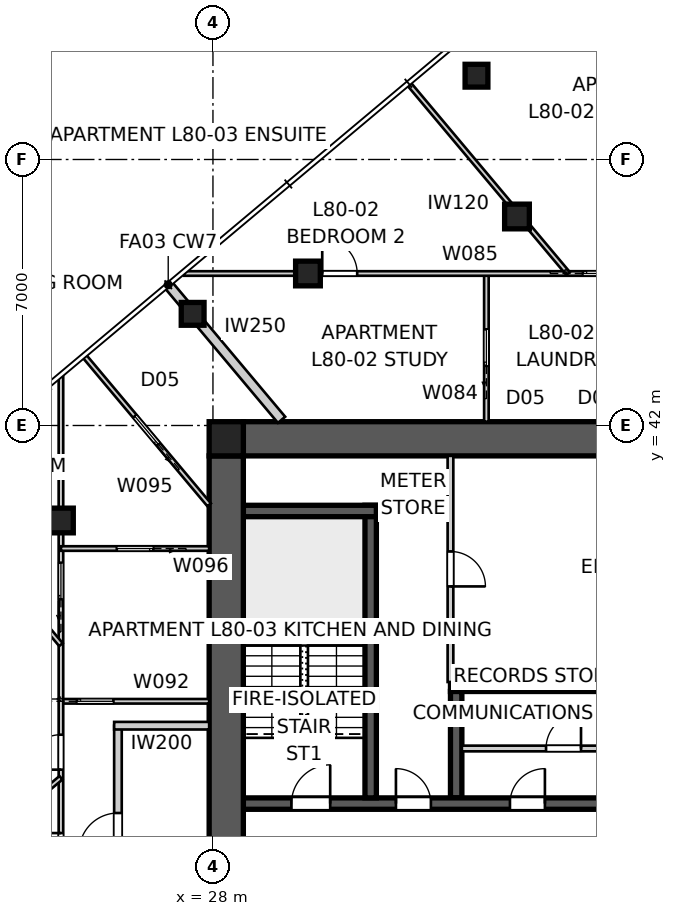
"""IFC4 building model, lengths in metres.
Left out: names, types, materials, properties, quantities, classifications, styles, units other than length and angle.
Written with IfcOpenShell. Run it as: python <this file> out.ifc"""

import sys

from ifc_helpers import new_model, si_unit, direction, frame, frame_2d, origin, origin_2d, place, context, subcontext, project, spatial, polyline, rectangle, outline, extrude, element, fill, save


model = new_model("IFC4")
c1 = context("Model", 3, precision=1e-05, world=origin(), true_north=direction((0.0, 1.0)))
c2 = subcontext(c1, "Body", "Model", "MODEL_VIEW")
j1 = project(units=[si_unit("LENGTHUNIT", "METRE"), si_unit("PLANEANGLEUNIT", "RADIAN")], contexts=[c1])
p1 = place(None, origin())
s1 = spatial("IfcSite", under=j1, at=p1, CompositionType="ELEMENT")
p2 = place(p1, origin())
s2 = spatial("IfcBuilding", under=s1, at=p2, CompositionType="ELEMENT")
p3 = place(p2, frame((0.0, 0.0, 289.6)))
s3 = spatial("IfcBuildingStorey", under=s2, at=p3, CompositionType="ELEMENT", Elevation=289.6)
p4 = place(p3, frame((28.8, 41.65, 0.0), z_axis=(0.0, 0.0, 1.0), x_axis=(1.0, 0.0, 0.0)))
e1 = element("IfcWall", 1, at=p4, inside=s3, PredefinedType="SHEAR", context=c2, shape_type="SweptSolid", body=[
    extrude(outline(polyline([(0.0, -0.45), (22.4, -0.45), (22.4, -0.025), (22.85, -0.025), (22.85, 0.025), (22.4, 0.025), (22.4, 0.45), (0.0, 0.45), (0.0, 0.025), (-0.45, 0.025), (-0.45, -0.025), (0.0, -0.025), (0.0, -0.45)])), origin(), (0.0, 0.0, 1.0), 3.4),
])
p5 = place(p3, frame((28.35, 41.2, 0.0), z_axis=(0.0, 0.0, 1.0), x_axis=(0.0, -1.0, 0.0)))
e2 = element("IfcWall", 2, at=p5, inside=s3, PredefinedType="SHEAR", context=c2, shape_type="SweptSolid", body=[
    extrude(outline(polyline([(0.0, -0.45), (22.4, -0.45), (22.4, -0.025), (22.85, -0.025), (22.85, 0.025), (22.4, 0.025), (22.4, 0.45), (0.0, 0.45), (0.0, 0.025), (-0.45, 0.025), (-0.45, -0.025), (0.0, -0.025), (0.0, -0.45)])), origin(), (0.0, 0.0, 1.0), 3.4),
])
p6 = place(p5, frame((11.14, 0.0, 0.0)))
e3 = element("IfcOpeningElement", 3, at=p6, cuts=e2, PredefinedType="OPENING", context=c2, shape_type="SweptSolid", body=[
    extrude(rectangle(XDim=1.02, YDim=2.4, at=frame_2d((0.51, 1.2))), frame((0.0, 0.46, 0.0), z_axis=(0.0, -1.0, 0.0), x_axis=(1.0, 0.0, 0.0)), (0.0, 0.0, 1.0), 0.92),
])
p7 = place(p3, frame((28.8, 32.05, 0.0), z_axis=(0.0, 0.0, 1.0), x_axis=(1.0, 0.0, 0.0)))
e4 = element("IfcWall", 4, at=p7, inside=s3, PredefinedType="SHEAR", context=c2, shape_type="SweptSolid", body=[
    extrude(rectangle(XDim=22.4, YDim=0.3, at=frame_2d((11.2, 0.0))), origin(), (0.0, 0.0, 1.0), 3.4),
])
p8 = place(p7, frame((19.04, 0.0, 0.0)))
e5 = element("IfcOpeningElement", 5, at=p8, cuts=e4, PredefinedType="OPENING", context=c2, shape_type="SweptSolid", body=[
    extrude(rectangle(XDim=0.92, YDim=2.1, at=frame_2d((0.46, 1.05))), frame((0.0, 0.16, 0.0), z_axis=(0.0, -1.0, 0.0), x_axis=(1.0, 0.0, 0.0)), (0.0, 0.0, 1.0), 0.32),
])
p9 = place(p7, frame((1.265, 0.0, 0.0)))
e6 = element("IfcOpeningElement", 6, at=p9, cuts=e4, PredefinedType="OPENING", context=c2, shape_type="SweptSolid", body=[
    extrude(rectangle(XDim=1.02, YDim=2.1, at=frame_2d((0.51, 1.05))), frame((0.0, 0.16, 0.0), z_axis=(0.0, -1.0, 0.0), x_axis=(1.0, 0.0, 0.0)), (0.0, 0.0, 1.0), 0.32),
])
p10 = place(p7, frame((4.015, 0.0, 0.0)))
e7 = element("IfcOpeningElement", 7, at=p10, cuts=e4, PredefinedType="OPENING", context=c2, shape_type="SweptSolid", body=[
    extrude(rectangle(XDim=0.92, YDim=2.1, at=frame_2d((0.46, 1.05))), frame((0.0, 0.16, 0.0), z_axis=(0.0, -1.0, 0.0), x_axis=(1.0, 0.0, 0.0)), (0.0, 0.0, 1.0), 0.32),
])
p11 = place(p7, frame((7.015, 0.0, 0.0)))
e8 = element("IfcOpeningElement", 8, at=p11, cuts=e4, PredefinedType="OPENING", context=c2, shape_type="SweptSolid", body=[
    extrude(rectangle(XDim=0.92, YDim=2.1, at=frame_2d((0.46, 1.05))), frame((0.0, 0.16, 0.0), z_axis=(0.0, -1.0, 0.0), x_axis=(1.0, 0.0, 0.0)), (0.0, 0.0, 1.0), 0.32),
])
p12 = place(p7, frame((9.34, 0.0, 0.0)))
e9 = element("IfcOpeningElement", 9, at=p12, cuts=e4, PredefinedType="OPENING", context=c2, shape_type="SweptSolid", body=[
    extrude(rectangle(XDim=0.92, YDim=2.1, at=frame_2d((0.46, 1.05))), frame((0.0, 0.16, 0.0), z_axis=(0.0, -1.0, 0.0), x_axis=(1.0, 0.0, 0.0)), (0.0, 0.0, 1.0), 0.32),
])
p13 = place(p7, frame((12.05, 0.0, 0.0)))
e10 = element("IfcOpeningElement", 10, at=p13, cuts=e4, PredefinedType="OPENING", context=c2, shape_type="SweptSolid", body=[
    extrude(rectangle(XDim=1.1, YDim=2.1, at=frame_2d((0.55, 1.05))), frame((0.0, 0.16, 0.0), z_axis=(0.0, -1.0, 0.0), x_axis=(1.0, 0.0, 0.0)), (0.0, 0.0, 1.0), 0.32),
])
p14 = place(p7, frame((14.85, 0.0, 0.0)))
e11 = element("IfcOpeningElement", 11, at=p14, cuts=e4, PredefinedType="OPENING", context=c2, shape_type="SweptSolid", body=[
    extrude(rectangle(XDim=1.1, YDim=2.1, at=frame_2d((0.55, 1.05))), frame((0.0, 0.16, 0.0), z_axis=(0.0, -1.0, 0.0), x_axis=(1.0, 0.0, 0.0)), (0.0, 0.0, 1.0), 0.32),
])
p15 = place(p3, frame((34.25, 35.15, 0.0), z_axis=(0.0, 0.0, 1.0), x_axis=(1.0, 0.0, 0.0)))
e12 = element("IfcWall", 12, at=p15, inside=s3, PredefinedType="SHEAR", context=c2, shape_type="SweptSolid", body=[
    extrude(rectangle(XDim=11.5, YDim=0.3, at=frame_2d((5.75, 0.0))), origin(), (0.0, 0.0, 1.0), 3.4),
])
p16 = place(p3, frame((34.4, 32.2, 0.0), z_axis=(0.0, 0.0, 1.0), x_axis=(0.0, 1.0, 0.0)))
e13 = element("IfcWall", 13, at=p16, inside=s3, PredefinedType="SHEAR", context=c2, shape_type="SweptSolid", body=[
    extrude(rectangle(XDim=2.8, YDim=0.3, at=frame_2d((1.4, 0.0))), origin(), (0.0, 0.0, 1.0), 3.4),
])
p17 = place(p3, frame((32.15, 32.2, 0.0), z_axis=(0.0, 0.0, 1.0), x_axis=(0.0, 1.0, 0.0)))
e14 = element("IfcWall", 14, at=p17, inside=s3, PredefinedType="SHEAR", context=c2, shape_type="SweptSolid", body=[
    extrude(rectangle(XDim=7.7, YDim=0.3, at=frame_2d((3.85, 0.0))), origin(), (0.0, 0.0, 1.0), 3.4),
])
p18 = place(p3, frame((28.8, 39.75, 0.0), z_axis=(0.0, 0.0, 1.0), x_axis=(1.0, 0.0, 0.0)))
e15 = element("IfcWall", 15, at=p18, inside=s3, PredefinedType="SHEAR", context=c2, shape_type="SweptSolid", body=[
    extrude(rectangle(XDim=3.5, YDim=0.3, at=frame_2d((1.75, 0.0))), origin(), (0.0, 0.0, 1.0), 3.4),
])
p19 = place(p3, frame((28.35, 41.65, 0.0), z_axis=(0.0, 0.0, 1.0), x_axis=(1.0, 0.0, 0.0)))
e16 = element("IfcColumn", 16, at=p19, inside=s3, PredefinedType="COLUMN", context=c2, shape_type="SweptSolid", body=[
    extrude(rectangle(XDim=0.9, YDim=0.9, at=origin_2d()), origin(), (0.0, 0.0, 1.0), 3.4),
])
for number, where, z_axis, x_axis in (
    (17, (34.935, 51.205, 0.0), (0.0, 0.0, 1.0), (1.0, 0.0, 0.0)),
    (18, (27.466, 44.938, 0.0), (0.0, 0.0, 1.0), (1.0, 0.0, 0.0)),
):
    element("IfcColumn", number, at=place(p3, frame(where, z_axis=z_axis, x_axis=x_axis)), inside=s3, PredefinedType="COLUMN", context=c2, shape_type="SweptSolid", body=[
        extrude(rectangle(XDim=0.6, YDim=0.6, at=origin_2d()), origin(), (0.0, 0.0, 1.0), 3.4),
    ])
for number, where, z_axis, x_axis in (
    (19, (36.0, 47.5, 0.0), (0.0, 0.0, 1.0), (1.0, 0.0, 0.0)),
    (20, (30.5, 46.0, 0.0), (0.0, 0.0, 1.0), (1.0, 0.0, 0.0)),
    (21, (24.0, 39.5, 0.0), (0.0, 0.0, 1.0), (1.0, 0.0, 0.0)),
):
    element("IfcColumn", number, at=place(p3, frame(where, z_axis=z_axis, x_axis=x_axis)), inside=s3, PredefinedType="COLUMN", context=c2, shape_type="SweptSolid", body=[
        extrude(rectangle(XDim=0.65, YDim=0.65, at=origin_2d()), origin(), (0.0, 0.0, 1.0), 3.4),
    ])
p20 = place(p3, frame((25.5, 25.9, 0.0), z_axis=(0.0, 0.0, 1.0), x_axis=(0.0, 1.0, 0.0)))
e22 = element("IfcWall", 22, at=p20, inside=s3, PredefinedType="PARTITIONING", context=c2, shape_type="SweptSolid", body=[
    extrude(rectangle(XDim=8.2, YDim=0.2, at=frame_2d((4.1, 0.0))), origin(), (0.0, 0.0, 1.0), 3.25),
])
p21 = place(p20, frame((4.882, 0.0, 0.0)))
e23 = element("IfcOpeningElement", 23, at=p21, cuts=e22, PredefinedType="OPENING", context=c2, shape_type="SweptSolid", body=[
    extrude(rectangle(XDim=1.02, YDim=2.34, at=frame_2d((0.51, 1.17))), frame((0.0, 0.11, 0.0), z_axis=(0.0, -1.0, 0.0), x_axis=(1.0, 0.0, 0.0)), (0.0, 0.0, 1.0), 0.22),
])
p22 = place(p3, frame((27.9, 34.1, 0.0), z_axis=(0.0, 0.0, 1.0), x_axis=(-1.0, 0.0, 0.0)))
e24 = element("IfcWall", 24, at=p22, inside=s3, PredefinedType="PARTITIONING", context=c2, shape_type="SweptSolid", body=[
    extrude(rectangle(XDim=2.5, YDim=0.2, at=frame_2d((1.25, 0.0))), origin(), (0.0, 0.0, 1.0), 3.25),
])
p23 = place(p3, frame((26.823, 45.704, 0.0), z_axis=(0.0, 0.0, 1.0), x_axis=(0.64279957712, -0.76603440109, 0.0)))
e25 = element("IfcWall", 25, at=p23, inside=s3, PredefinedType="PARTITIONING", context=c2, shape_type="SweptSolid", body=[
    extrude(rectangle(XDim=4.64, YDim=0.25, at=frame_2d((2.32, 0.0))), origin(), (0.0, 0.0, 1.0), 3.25),
])
p24 = place(p3, frame((34.25, 41.2, 0.0), z_axis=(0.0, 0.0, 1.0), x_axis=(0.0, -1.0, 0.0)))
e26 = element("IfcWall", 26, at=p24, inside=s3, PredefinedType="SOLIDWALL", context=c2, shape_type="SweptSolid", body=[
    extrude(rectangle(XDim=5.95, YDim=0.15, at=frame_2d((2.975, 0.0))), origin(), (0.0, 0.0, 1.0), 3.25),
])
p25 = place(p24, frame((2.515, 0.0, 0.0)))
e27 = element("IfcOpeningElement", 27, at=p25, cuts=e26, PredefinedType="OPENING", context=c2, shape_type="SweptSolid", body=[
    extrude(rectangle(XDim=0.92, YDim=2.1, at=frame_2d((0.46, 1.05))), frame((0.0, 0.085, 0.0), z_axis=(0.0, -1.0, 0.0), x_axis=(1.0, 0.0, 0.0)), (0.0, 0.0, 1.0), 0.17),
])
p26 = place(p3, frame((35.195, 42.1, 0.0), z_axis=(0.0, 0.0, 1.0), x_axis=(0.0, 1.0, 0.0)))
e28 = element("IfcWall", 28, at=p26, inside=s3, PredefinedType="PARTITIONING", context=c2, shape_type="SweptSolid", body=[
    extrude(rectangle(XDim=3.9, YDim=0.12, at=frame_2d((1.95, 0.0))), origin(), (0.0, 0.0, 1.0), 3.25),
])
p27 = place(p26, frame((1.47, 0.0, 0.0)))
e29 = element("IfcOpeningElement", 29, at=p27, cuts=e28, PredefinedType="OPENING", context=c2, shape_type="SweptSolid", body=[
    extrude(rectangle(XDim=0.96, YDim=2.1, at=frame_2d((0.48, 1.05))), frame((0.0, 0.07, 0.0), z_axis=(0.0, -1.0, 0.0), x_axis=(1.0, 0.0, 0.0)), (0.0, 0.0, 1.0), 0.14),
])
p28 = place(p3, frame((27.238, 46.0, 0.0), z_axis=(0.0, 0.0, 1.0), x_axis=(1.0, 0.0, 0.0)))
e30 = element("IfcWall", 30, at=p28, inside=s3, PredefinedType="PARTITIONING", context=c2, shape_type="SweptSolid", body=[
    extrude(rectangle(XDim=11.915, YDim=0.12, at=frame_2d((5.957, 0.0))), origin(), (0.0, 0.0, 1.0), 2.55),
])
p29 = place(p28, frame((3.637, 0.0, 0.0)))
e31 = element("IfcOpeningElement", 31, at=p29, cuts=e30, PredefinedType="OPENING", context=c2, shape_type="SweptSolid", body=[
    extrude(rectangle(XDim=0.92, YDim=2.34, at=frame_2d((0.46, 1.17))), frame((0.0, 0.07, 0.0), z_axis=(0.0, -1.0, 0.0), x_axis=(1.0, 0.0, 0.0)), (0.0, 0.0, 1.0), 0.14),
])
p30 = place(p28, frame((10.498, 0.0, 0.0)))
e32 = element("IfcOpeningElement", 32, at=p30, cuts=e30, PredefinedType="OPENING", context=c2, shape_type="SweptSolid", body=[
    extrude(rectangle(XDim=0.96, YDim=2.1, at=frame_2d((0.48, 1.05))), frame((0.0, 0.07, 0.0), z_axis=(0.0, -1.0, 0.0), x_axis=(1.0, 0.0, 0.0)), (0.0, 0.0, 1.0), 0.14),
])
p31 = place(p3, frame((37.344, 46.0, 0.0), z_axis=(0.0, 0.0, 1.0), x_axis=(-0.642779498388, 0.766051249233, 0.0)))
e33 = element("IfcWall", 33, at=p31, inside=s3, PredefinedType="PARTITIONING", context=c2, shape_type="SweptSolid", body=[
    extrude(rectangle(XDim=6.496, YDim=0.12, at=frame_2d((3.248, 0.0))), origin(), (0.0, 0.0, 1.0), 3.25),
])
p32 = place(p3, frame((24.0, 34.742, 0.0), z_axis=(0.0, 0.0, 1.0), x_axis=(1.0, 0.0, 0.0)))
e34 = element("IfcWall", 34, at=p32, inside=s3, PredefinedType="PARTITIONING", context=c2, shape_type="SweptSolid", body=[
    extrude(rectangle(XDim=3.9, YDim=0.12, at=frame_2d((1.95, 0.0))), origin(), (0.0, 0.0, 1.0), 3.25),
])
p33 = place(p32, frame((0.42, 0.0, 0.0)))
e35 = element("IfcOpeningElement", 35, at=p33, cuts=e34, PredefinedType="OPENING", context=c2, shape_type="SweptSolid", body=[
    extrude(rectangle(XDim=0.96, YDim=2.1, at=frame_2d((0.48, 1.05))), frame((0.0, 0.07, 0.0), z_axis=(0.0, -1.0, 0.0), x_axis=(1.0, 0.0, 0.0)), (0.0, 0.0, 1.0), 0.14),
])
p34 = place(p3, frame((24.0, 17.238, 0.0), z_axis=(0.0, 0.0, 1.0), x_axis=(0.0, 1.0, 0.0)))
e36 = element("IfcWall", 36, at=p34, inside=s3, PredefinedType="PARTITIONING", context=c2, shape_type="SweptSolid", body=[
    extrude(rectangle(XDim=26.045, YDim=0.12, at=frame_2d((13.022, 0.0))), origin(), (0.0, 0.0, 1.0), 2.55),
])
p35 = place(p34, frame((13.116, 0.0, 0.0)))
e37 = element("IfcOpeningElement", 37, at=p35, cuts=e36, PredefinedType="OPENING", context=c2, shape_type="SweptSolid", body=[
    extrude(rectangle(XDim=0.92, YDim=2.34, at=frame_2d((0.46, 1.17))), frame((0.0, 0.07, 0.0), z_axis=(0.0, -1.0, 0.0), x_axis=(1.0, 0.0, 0.0)), (0.0, 0.0, 1.0), 0.14),
])
p36 = place(p34, frame((15.705, 0.0, 0.0)))
e38 = element("IfcOpeningElement", 38, at=p36, cuts=e36, PredefinedType="OPENING", context=c2, shape_type="SweptSolid", body=[
    extrude(rectangle(XDim=0.92, YDim=2.34, at=frame_2d((0.46, 1.17))), frame((0.0, 0.07, 0.0), z_axis=(0.0, -1.0, 0.0), x_axis=(1.0, 0.0, 0.0)), (0.0, 0.0, 1.0), 0.14),
])
p37 = place(p34, frame((20.191, 0.0, 0.0)))
e39 = element("IfcOpeningElement", 39, at=p37, cuts=e36, PredefinedType="OPENING", context=c2, shape_type="SweptSolid", body=[
    extrude(rectangle(XDim=0.96, YDim=2.1, at=frame_2d((0.48, 1.05))), frame((0.0, 0.07, 0.0), z_axis=(0.0, -1.0, 0.0), x_axis=(1.0, 0.0, 0.0)), (0.0, 0.0, 1.0), 0.14),
])
p38 = place(p34, frame((3.631, 0.0, 0.0)))
e40 = element("IfcOpeningElement", 40, at=p38, cuts=e36, PredefinedType="OPENING", context=c2, shape_type="SweptSolid", body=[
    extrude(rectangle(XDim=0.92, YDim=2.34, at=frame_2d((0.46, 1.17))), frame((0.0, 0.07, 0.0), z_axis=(0.0, -1.0, 0.0), x_axis=(1.0, 0.0, 0.0)), (0.0, 0.0, 1.0), 0.14),
])
p39 = place(p3, frame((27.9, 39.913, 0.0), z_axis=(0.0, 0.0, 1.0), x_axis=(-0.64279031777, 0.766042170759, 0.0)))
e41 = element("IfcWall", 41, at=p39, inside=s3, PredefinedType="PARTITIONING", context=c2, shape_type="SweptSolid", body=[
    extrude(rectangle(XDim=5.089, YDim=0.12, at=frame_2d((2.544, 0.0))), origin(), (0.0, 0.0, 1.0), 3.25),
])
p40 = place(p39, frame((2.084, 0.0, 0.0)))
e42 = element("IfcOpeningElement", 42, at=p40, cuts=e41, PredefinedType="OPENING", context=c2, shape_type="SweptSolid", body=[
    extrude(rectangle(XDim=0.96, YDim=2.1, at=frame_2d((0.48, 1.05))), frame((0.0, 0.07, 0.0), z_axis=(0.0, -1.0, 0.0), x_axis=(1.0, 0.0, 0.0)), (0.0, 0.0, 1.0), 0.14),
])
p41 = place(p3, frame((27.9, 38.762, 0.0), z_axis=(0.0, 0.0, 1.0), x_axis=(-1.0, 0.0, 0.0)))
e43 = element("IfcWall", 43, at=p41, inside=s3, PredefinedType="PARTITIONING", context=c2, shape_type="SweptSolid", body=[
    extrude(rectangle(XDim=3.9, YDim=0.12, at=frame_2d((1.95, 0.0))), origin(), (0.0, 0.0, 1.0), 2.796),
])
p42 = place(p41, frame((1.47, 0.0, 0.0)))
e44 = element("IfcOpeningElement", 44, at=p42, cuts=e43, PredefinedType="OPENING", context=c2, shape_type="SweptSolid", body=[
    extrude(rectangle(XDim=0.96, YDim=2.1, at=frame_2d((0.48, 1.05))), frame((0.0, 0.07, 0.0), z_axis=(0.0, -1.0, 0.0), x_axis=(1.0, 0.0, 0.0)), (0.0, 0.0, 1.0), 0.14),
])
p43 = place(p3, frame((24.0, 32.729, 0.0), z_axis=(0.0, 0.0, 1.0), x_axis=(-0.766044319693, -0.64278775678, 0.0)))
e45 = element("IfcWall", 45, at=p43, inside=s3, PredefinedType="PARTITIONING", context=c2, shape_type="SweptSolid", body=[
    extrude(rectangle(XDim=9.957, YDim=0.12, at=frame_2d((4.979, 0.0))), origin(), (0.0, 0.0, 1.0), 3.25),
])
p44 = place(p3, frame((20.529, 40.37, 0.0), z_axis=(0.0, 0.0, 1.0), x_axis=(0.642799726543, -0.766034275706, 0.0)))
e46 = element("IfcWall", 46, at=p44, inside=s3, PredefinedType="PARTITIONING", context=c2, shape_type="SweptSolid", body=[
    extrude(rectangle(XDim=5.4, YDim=0.12, at=frame_2d((2.7, 0.0))), origin(), (0.0, 0.0, 1.0), 3.25),
])
p45 = place(p3, frame((34.55, 33.5, 0.0), z_axis=(0.0, 0.0, 1.0), x_axis=(1.0, 0.0, 0.0)))
e47 = element("IfcWall", 47, at=p45, inside=s3, PredefinedType="SOLIDWALL", context=c2, shape_type="SweptSolid", body=[
    extrude(rectangle(XDim=5.35, YDim=0.15, at=frame_2d((2.675, 0.0))), origin(), (0.0, 0.0, 1.0), 3.25),
])
p46 = place(p45, frame((2.215, 0.0, 0.0)))
e48 = element("IfcOpeningElement", 48, at=p46, cuts=e47, PredefinedType="OPENING", context=c2, shape_type="SweptSolid", body=[
    extrude(rectangle(XDim=0.92, YDim=2.1, at=frame_2d((0.46, 1.05))), frame((0.0, 0.085, 0.0), z_axis=(0.0, -1.0, 0.0), x_axis=(1.0, 0.0, 0.0)), (0.0, 0.0, 1.0), 0.17),
])
p47 = place(p9, origin())
e49 = element("IfcDoor", 49, at=p47, inside=s3, OperationType="SINGLE_SWING_RIGHT", PredefinedType="DOOR", context=c2, shape_type="SweptSolid", body=[
    extrude(rectangle(XDim=1.02, YDim=2.1, at=frame_2d((0.51, 1.05))), frame((0.0, 0.025, 0.0), z_axis=(0.0, -1.0, 0.0), x_axis=(1.0, 0.0, 0.0)), (0.0, 0.0, 1.0), 0.05),
])
fill(e6, e49)
p48 = place(p10, origin())
e50 = element("IfcDoor", 50, at=p48, inside=s3, OperationType="SINGLE_SWING_LEFT", PredefinedType="DOOR", context=c2, shape_type="SweptSolid", body=[
    extrude(rectangle(XDim=0.92, YDim=2.1, at=frame_2d((0.46, 1.05))), frame((0.0, 0.025, 0.0), z_axis=(0.0, -1.0, 0.0), x_axis=(1.0, 0.0, 0.0)), (0.0, 0.0, 1.0), 0.05),
])
fill(e7, e50)
p49 = place(p21, origin())
e51 = element("IfcDoor", 51, at=p49, inside=s3, OperationType="SINGLE_SWING_LEFT", PredefinedType="DOOR", context=c2, shape_type="SweptSolid", body=[
    extrude(rectangle(XDim=1.02, YDim=2.34, at=frame_2d((0.51, 1.17))), frame((0.0, 0.025, 0.0), z_axis=(0.0, -1.0, 0.0), x_axis=(1.0, 0.0, 0.0)), (0.0, 0.0, 1.0), 0.05),
])
fill(e23, e51)
p50 = place(p25, origin())
e52 = element("IfcDoor", 52, at=p50, inside=s3, OperationType="SINGLE_SWING_RIGHT", PredefinedType="DOOR", context=c2, shape_type="SweptSolid", body=[
    extrude(rectangle(XDim=0.92, YDim=2.1, at=frame_2d((0.46, 1.05))), frame((0.0, 0.025, 0.0), z_axis=(0.0, -1.0, 0.0), x_axis=(1.0, 0.0, 0.0)), (0.0, 0.0, 1.0), 0.05),
])
fill(e27, e52)
p51 = place(p35, origin())
e53 = element("IfcDoor", 53, at=p51, inside=s3, OperationType="SINGLE_SWING_RIGHT", PredefinedType="DOOR", context=c2, shape_type="SweptSolid", body=[
    extrude(rectangle(XDim=0.92, YDim=2.34, at=frame_2d((0.46, 1.17))), frame((0.0, 0.025, 0.0), z_axis=(0.0, -1.0, 0.0), x_axis=(1.0, 0.0, 0.0)), (0.0, 0.0, 1.0), 0.05),
])
fill(e37, e53)
p52 = place(p33, origin())
e54 = element("IfcDoor", 54, at=p52, inside=s3, OperationType="SLIDING_TO_LEFT", PredefinedType="DOOR", context=c2, shape_type="SweptSolid", body=[
    extrude(rectangle(XDim=0.96, YDim=2.1, at=frame_2d((0.48, 1.05))), frame((0.0, 0.025, 0.0), z_axis=(0.0, -1.0, 0.0), x_axis=(1.0, 0.0, 0.0)), (0.0, 0.0, 1.0), 0.05),
])
fill(e35, e54)
p53 = place(p36, origin())
e55 = element("IfcDoor", 55, at=p53, inside=s3, OperationType="SINGLE_SWING_LEFT", PredefinedType="DOOR", context=c2, shape_type="SweptSolid", body=[
    extrude(rectangle(XDim=0.92, YDim=2.34, at=frame_2d((0.46, 1.17))), frame((0.0, 0.025, 0.0), z_axis=(0.0, -1.0, 0.0), x_axis=(1.0, 0.0, 0.0)), (0.0, 0.0, 1.0), 0.05),
])
fill(e38, e55)
p54 = place(p42, origin())
e56 = element("IfcDoor", 56, at=p54, inside=s3, OperationType="SLIDING_TO_LEFT", PredefinedType="DOOR", context=c2, shape_type="SweptSolid", body=[
    extrude(rectangle(XDim=0.96, YDim=2.1, at=frame_2d((0.48, 1.05))), frame((0.0, 0.025, 0.0), z_axis=(0.0, -1.0, 0.0), x_axis=(1.0, 0.0, 0.0)), (0.0, 0.0, 1.0), 0.05),
])
fill(e44, e56)
p55 = place(p37, origin())
e57 = element("IfcDoor", 57, at=p55, inside=s3, OperationType="SLIDING_TO_LEFT", PredefinedType="DOOR", context=c2, shape_type="SweptSolid", body=[
    extrude(rectangle(XDim=0.96, YDim=2.1, at=frame_2d((0.48, 1.05))), frame((0.0, 0.025, 0.0), z_axis=(0.0, -1.0, 0.0), x_axis=(1.0, 0.0, 0.0)), (0.0, 0.0, 1.0), 0.05),
])
fill(e39, e57)
p56 = place(p40, origin())
e58 = element("IfcDoor", 58, at=p56, inside=s3, OperationType="SLIDING_TO_LEFT", PredefinedType="DOOR", context=c2, shape_type="SweptSolid", body=[
    extrude(rectangle(XDim=0.96, YDim=2.1, at=frame_2d((0.48, 1.05))), frame((0.0, 0.025, 0.0), z_axis=(0.0, -1.0, 0.0), x_axis=(1.0, 0.0, 0.0)), (0.0, 0.0, 1.0), 0.05),
])
fill(e42, e58)
p57 = place(p27, origin())
e59 = element("IfcDoor", 59, at=p57, inside=s3, OperationType="SLIDING_TO_LEFT", PredefinedType="DOOR", context=c2, shape_type="SweptSolid", body=[
    extrude(rectangle(XDim=0.96, YDim=2.1, at=frame_2d((0.48, 1.05))), frame((0.0, 0.025, 0.0), z_axis=(0.0, -1.0, 0.0), x_axis=(1.0, 0.0, 0.0)), (0.0, 0.0, 1.0), 0.05),
])
fill(e29, e59)
p58 = place(p29, origin())
e60 = element("IfcDoor", 60, at=p58, inside=s3, OperationType="SINGLE_SWING_LEFT", PredefinedType="DOOR", context=c2, shape_type="SweptSolid", body=[
    extrude(rectangle(XDim=0.92, YDim=2.34, at=frame_2d((0.46, 1.17))), frame((0.0, 0.025, 0.0), z_axis=(0.0, -1.0, 0.0), x_axis=(1.0, 0.0, 0.0)), (0.0, 0.0, 1.0), 0.05),
])
fill(e31, e60)
p59 = place(p30, origin())
e61 = element("IfcDoor", 61, at=p59, inside=s3, OperationType="SLIDING_TO_LEFT", PredefinedType="DOOR", context=c2, shape_type="SweptSolid", body=[
    extrude(rectangle(XDim=0.96, YDim=2.1, at=frame_2d((0.48, 1.05))), frame((0.0, 0.025, 0.0), z_axis=(0.0, -1.0, 0.0), x_axis=(1.0, 0.0, 0.0)), (0.0, 0.0, 1.0), 0.05),
])
fill(e32, e61)
p60 = place(p11, origin())
e62 = element("IfcDoor", 62, at=p60, inside=s3, OperationType="SINGLE_SWING_RIGHT", PredefinedType="DOOR", context=c2, shape_type="SweptSolid", body=[
    extrude(rectangle(XDim=0.92, YDim=2.1, at=frame_2d((0.46, 1.05))), frame((0.0, 0.025, 0.0), z_axis=(0.0, -1.0, 0.0), x_axis=(1.0, 0.0, 0.0)), (0.0, 0.0, 1.0), 0.05),
])
fill(e8, e62)
p61 = place(p46, origin())
e63 = element("IfcDoor", 63, at=p61, inside=s3, OperationType="SINGLE_SWING_RIGHT", PredefinedType="DOOR", context=c2, shape_type="SweptSolid", body=[
    extrude(rectangle(XDim=0.92, YDim=2.1, at=frame_2d((0.46, 1.05))), frame((0.0, 0.025, 0.0), z_axis=(0.0, -1.0, 0.0), x_axis=(1.0, 0.0, 0.0)), (0.0, 0.0, 1.0), 0.05),
])
fill(e48, e63)
save(model, sys.argv[1])
